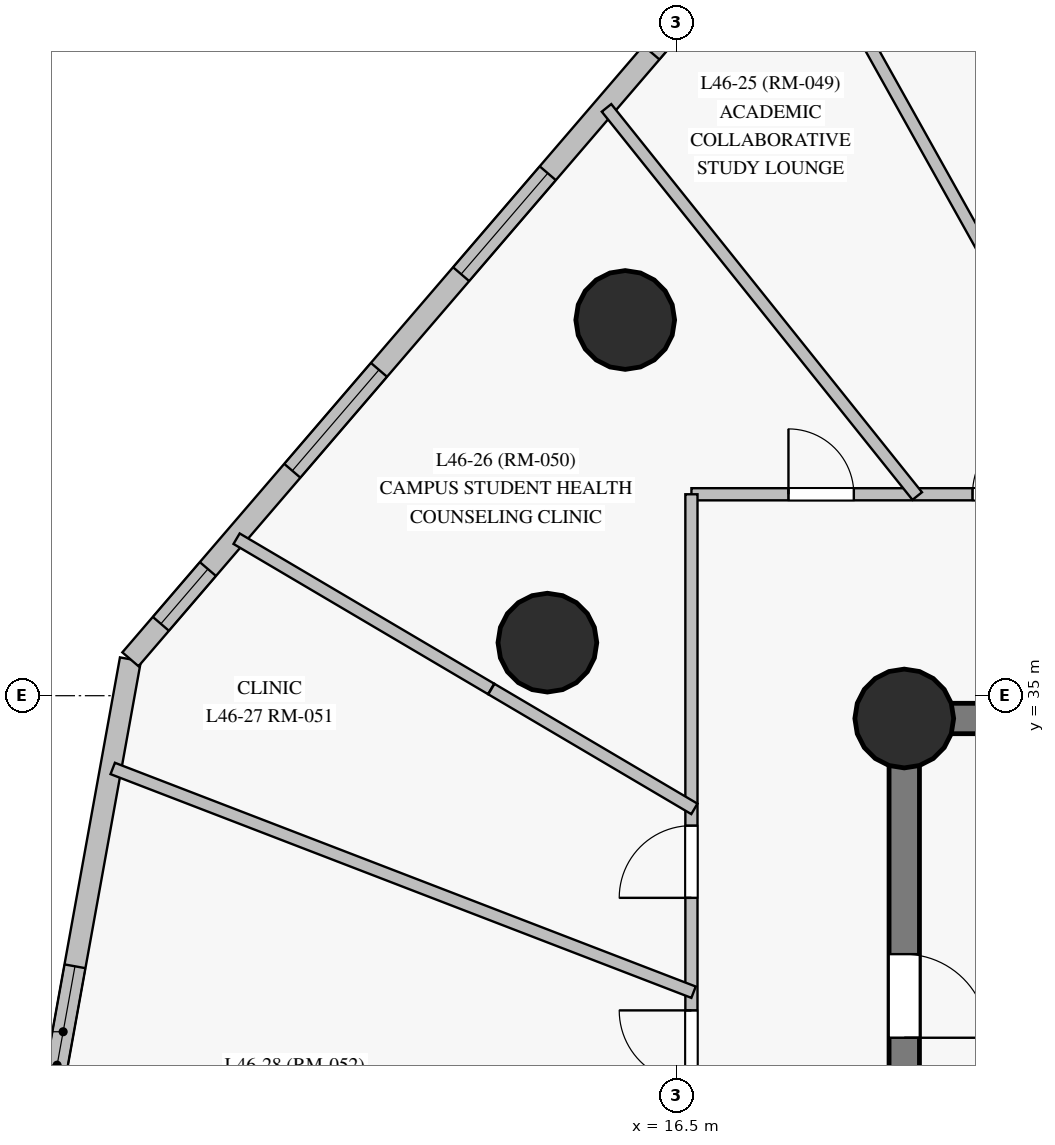
"""IFC4 building model, lengths in metres.
Left out: names, types, materials, properties, quantities, classifications, styles, units other than length and angle.
Written with IfcOpenShell. Run it as: python <this file> out.ifc"""

import sys

from ifc_helpers import new_model, si_unit, direction, frame, frame_2d, origin, origin_with_axes, origin_2d, place, context, subcontext, project, spatial, rectangle, circle, extrude, source, transform, mapped, element, fill, save


model = new_model("IFC4")
c1 = context("Model", 3, precision=1e-05, world=origin(), true_north=direction((0.0, 1.0)))
c2 = subcontext(c1, "Body", "Model", "MODEL_VIEW")
j1 = project(units=[si_unit("LENGTHUNIT", "METRE"), si_unit("PLANEANGLEUNIT", "RADIAN")], contexts=[c1])
p1 = place(None, origin())
s1 = spatial("IfcSite", under=j1, at=p1, CompositionType="ELEMENT")
p2 = place(p1, origin())
s2 = spatial("IfcBuilding", under=s1, at=p2, CompositionType="ELEMENT")
p3 = place(p2, frame((0.0, 0.0, 162.65)))
s3 = spatial("IfcBuildingStorey", under=s2, at=p3, CompositionType="ELEMENT", Elevation=162.65)
p4 = place(p3, frame((26.55, 34.7, 0.0), z_axis=(0.0, 0.0, 1.0), x_axis=(-1.0, 0.0, 0.0)))
e1 = element("IfcWall", 1, at=p4, inside=s3, PredefinedType="SHEAR", context=c2, shape_type="SweptSolid", body=[
    extrude(rectangle(XDim=7.05, YDim=0.4, at=frame_2d((3.525, 0.0))), origin(), (0.0, 0.0, 1.0), 2.825),
])
p5 = place(p4, frame((4.25, 0.0, 0.0)))
e2 = element("IfcOpeningElement", 2, at=p5, cuts=e1, PredefinedType="OPENING", context=c2, shape_type="SweptSolid", body=[
    extrude(rectangle(XDim=1.1, YDim=2.15, at=frame_2d((0.55, 1.075))), frame((0.0, 0.21, 0.0), z_axis=(0.0, -1.0, 0.0), x_axis=(1.0, 0.0, 0.0)), (0.0, 0.0, 1.0), 0.42),
])
p6 = place(p3, frame((19.5, 34.7, 0.0), z_axis=(0.0, 0.0, 1.0), x_axis=(0.0, -1.0, 0.0)))
e3 = element("IfcWall", 3, at=p6, inside=s3, PredefinedType="SHEAR", context=c2, shape_type="SweptSolid", body=[
    extrude(rectangle(XDim=16.4, YDim=0.4, at=frame_2d((8.2, 0.0))), origin(), (0.0, 0.0, 1.0), 2.825),
])
p7 = place(p6, frame((3.1, 0.0, 0.0)))
e4 = element("IfcOpeningElement", 4, at=p7, cuts=e3, PredefinedType="OPENING", context=c2, shape_type="SweptSolid", body=[
    extrude(rectangle(XDim=1.1, YDim=2.15, at=frame_2d((0.55, 1.075))), frame((0.0, 0.21, 0.0), z_axis=(0.0, -1.0, 0.0), x_axis=(1.0, 0.0, 0.0)), (0.0, 0.0, 1.0), 0.42),
])
m1 = source(origin_with_axes(), c2, "Body", "SweptSolid", [
    extrude(circle(Radius=0.65, at=origin_2d()), origin(), (0.0, 0.0, 1.0), 3.05),
])
for number, where, z_axis, x_axis in (
    (5, (19.5, 34.7, 0.0), (0.0, 0.0, 1.0), (1.0, 0.0, 0.0)),
    (6, (15.829, 39.943, 0.0), (0.0, 0.0, 1.0), (1.0, 0.0, 0.0)),
    (7, (14.805, 35.698, 0.0), (0.0, 0.0, 1.0), (1.0, 0.0, 0.0)),
):
    element("IfcColumn", number, at=place(p3, frame(where, z_axis=z_axis, x_axis=x_axis)), inside=s3, PredefinedType="COLUMN", context=c2, shape_type="MappedRepresentation", body=[
        mapped(m1, transform((0.0, 0.0, 0.0), scale=1.0)),
    ])
p8 = place(p3, frame((9.319, 35.479, 0.0), z_axis=(0.0, 0.0, 1.0), x_axis=(-0.177764832346, -0.984072997486, 0.0)))
e8 = element("IfcWall", 8, at=p8, inside=s3, PredefinedType="SOLIDWALL", context=c2, shape_type="SweptSolid", body=[
    extrude(rectangle(XDim=10.853, YDim=0.28, at=frame_2d((5.426, 0.0))), origin(), (0.0, 0.0, 1.0), 2.825),
])
p9 = place(p8, frame((4.104, 0.0, 0.85)))
e9 = element("IfcOpeningElement", 9, at=p9, cuts=e8, PredefinedType="OPENING", context=c2, shape_type="SweptSolid", body=[
    extrude(rectangle(XDim=1.75, YDim=1.65, at=frame_2d((0.875, 0.825))), frame((0.0, 0.15, 0.0), z_axis=(0.0, -1.0, 0.0), x_axis=(1.0, 0.0, 0.0)), (0.0, 0.0, 1.0), 0.3),
])
p10 = place(p8, frame((9.167, 0.0, 0.85)))
e10 = element("IfcOpeningElement", 10, at=p10, cuts=e8, PredefinedType="OPENING", context=c2, shape_type="SweptSolid", body=[
    extrude(rectangle(XDim=0.95, YDim=1.5, at=frame_2d((0.475, 0.75))), frame((0.0, 0.15, 0.0), z_axis=(0.0, -1.0, 0.0), x_axis=(1.0, 0.0, 0.0)), (0.0, 0.0, 1.0), 0.3),
])
p11 = place(p3, frame((18.215, 45.839, 0.0), z_axis=(0.0, 0.0, 1.0), x_axis=(-0.651462515178, -0.758680823085, 0.0)))
e11 = element("IfcWall", 11, at=p11, inside=s3, PredefinedType="SOLIDWALL", context=c2, shape_type="SweptSolid", body=[
    extrude(rectangle(XDim=13.656, YDim=0.28, at=frame_2d((6.828, 0.0))), origin(), (0.0, 0.0, 1.0), 2.825),
])
p12 = place(p11, frame((1.385, 0.0, 0.85)))
e12 = element("IfcOpeningElement", 12, at=p12, cuts=e11, PredefinedType="OPENING", context=c2, shape_type="SweptSolid", body=[
    extrude(rectangle(XDim=1.75, YDim=1.65, at=frame_2d((0.875, 0.825))), frame((0.0, 0.15, 0.0), z_axis=(0.0, -1.0, 0.0), x_axis=(1.0, 0.0, 0.0)), (0.0, 0.0, 1.0), 0.3),
])
p13 = place(p11, frame((5.227, 0.0, 0.85)))
e13 = element("IfcOpeningElement", 13, at=p13, cuts=e11, PredefinedType="OPENING", context=c2, shape_type="SweptSolid", body=[
    extrude(rectangle(XDim=1.75, YDim=1.65, at=frame_2d((0.875, 0.825))), frame((0.0, 0.15, 0.0), z_axis=(0.0, -1.0, 0.0), x_axis=(1.0, 0.0, 0.0)), (0.0, 0.0, 1.0), 0.3),
])
p14 = place(p11, frame((8.636, 0.0, 0.85)))
e14 = element("IfcOpeningElement", 14, at=p14, cuts=e11, PredefinedType="OPENING", context=c2, shape_type="SweptSolid", body=[
    extrude(rectangle(XDim=1.75, YDim=1.65, at=frame_2d((0.875, 0.825))), frame((0.0, 0.15, 0.0), z_axis=(0.0, -1.0, 0.0), x_axis=(1.0, 0.0, 0.0)), (0.0, 0.0, 1.0), 0.3),
])
p15 = place(p11, frame((12.091, 0.0, 0.85)))
e15 = element("IfcOpeningElement", 15, at=p15, cuts=e11, PredefinedType="OPENING", context=c2, shape_type="SweptSolid", body=[
    extrude(rectangle(XDim=0.95, YDim=1.5, at=frame_2d((0.475, 0.75))), frame((0.0, 0.15, 0.0), z_axis=(0.0, -1.0, 0.0), x_axis=(1.0, 0.0, 0.0)), (0.0, 0.0, 1.0), 0.3),
])
p16 = place(p3, frame((16.7, 37.65, 0.0), z_axis=(0.0, 0.0, 1.0), x_axis=(1.0, 0.0, 0.0)))
e16 = element("IfcWall", 16, at=p16, inside=s3, PredefinedType="PARTITIONING", context=c2, shape_type="SweptSolid", body=[
    extrude(rectangle(XDim=23.5, YDim=0.16, at=frame_2d((11.75, 0.0))), origin(), (0.0, 0.0, 1.0), 2.375),
])
p17 = place(p16, frame((20.87, 0.0, 0.0)))
e17 = element("IfcOpeningElement", 17, at=p17, cuts=e16, PredefinedType="OPENING", context=c2, shape_type="SweptSolid", body=[
    extrude(rectangle(XDim=0.95, YDim=2.15, at=frame_2d((0.475, 1.075))), frame((0.0, 0.09, 0.0), z_axis=(0.0, -1.0, 0.0), x_axis=(1.0, 0.0, 0.0)), (0.0, 0.0, 1.0), 0.18),
])
p18 = place(p16, frame((17.74, 0.0, 0.0)))
e18 = element("IfcOpeningElement", 18, at=p18, cuts=e16, PredefinedType="OPENING", context=c2, shape_type="SweptSolid", body=[
    extrude(rectangle(XDim=0.95, YDim=2.15, at=frame_2d((0.475, 1.075))), frame((0.0, 0.09, 0.0), z_axis=(0.0, -1.0, 0.0), x_axis=(1.0, 0.0, 0.0)), (0.0, 0.0, 1.0), 0.18),
])
p19 = place(p16, frame((15.44, 0.0, 0.0)))
e19 = element("IfcOpeningElement", 19, at=p19, cuts=e16, PredefinedType="OPENING", context=c2, shape_type="SweptSolid", body=[
    extrude(rectangle(XDim=0.95, YDim=2.15, at=frame_2d((0.475, 1.075))), frame((0.0, 0.09, 0.0), z_axis=(0.0, -1.0, 0.0), x_axis=(1.0, 0.0, 0.0)), (0.0, 0.0, 1.0), 0.18),
])
p20 = place(p16, frame((13.568, 0.0, 0.0)))
e20 = element("IfcOpeningElement", 20, at=p20, cuts=e16, PredefinedType="OPENING", context=c2, shape_type="SweptSolid", body=[
    extrude(rectangle(XDim=0.95, YDim=2.15, at=frame_2d((0.475, 1.075))), frame((0.0, 0.09, 0.0), z_axis=(0.0, -1.0, 0.0), x_axis=(1.0, 0.0, 0.0)), (0.0, 0.0, 1.0), 0.18),
])
p21 = place(p16, frame((11.365, 0.0, 0.0)))
e21 = element("IfcOpeningElement", 21, at=p21, cuts=e16, PredefinedType="OPENING", context=c2, shape_type="SweptSolid", body=[
    extrude(rectangle(XDim=0.95, YDim=2.15, at=frame_2d((0.475, 1.075))), frame((0.0, 0.09, 0.0), z_axis=(0.0, -1.0, 0.0), x_axis=(1.0, 0.0, 0.0)), (0.0, 0.0, 1.0), 0.18),
])
p22 = place(p16, frame((9.159, 0.0, 0.0)))
e22 = element("IfcOpeningElement", 22, at=p22, cuts=e16, PredefinedType="OPENING", context=c2, shape_type="SweptSolid", body=[
    extrude(rectangle(XDim=0.95, YDim=2.15, at=frame_2d((0.475, 1.075))), frame((0.0, 0.09, 0.0), z_axis=(0.0, -1.0, 0.0), x_axis=(1.0, 0.0, 0.0)), (0.0, 0.0, 1.0), 0.18),
])
p23 = place(p16, frame((5.89, 0.0, 0.0)))
e23 = element("IfcOpeningElement", 23, at=p23, cuts=e16, PredefinedType="OPENING", context=c2, shape_type="SweptSolid", body=[
    extrude(rectangle(XDim=0.95, YDim=2.15, at=frame_2d((0.475, 1.075))), frame((0.0, 0.09, 0.0), z_axis=(0.0, -1.0, 0.0), x_axis=(1.0, 0.0, 0.0)), (0.0, 0.0, 1.0), 0.18),
])
p24 = place(p16, frame((3.698, 0.0, 0.0)))
e24 = element("IfcOpeningElement", 24, at=p24, cuts=e16, PredefinedType="OPENING", context=c2, shape_type="SweptSolid", body=[
    extrude(rectangle(XDim=0.95, YDim=2.15, at=frame_2d((0.475, 1.075))), frame((0.0, 0.09, 0.0), z_axis=(0.0, -1.0, 0.0), x_axis=(1.0, 0.0, 0.0)), (0.0, 0.0, 1.0), 0.18),
])
p25 = place(p16, frame((1.277, 0.0, 0.0)))
e25 = element("IfcOpeningElement", 25, at=p25, cuts=e16, PredefinedType="OPENING", context=c2, shape_type="SweptSolid", body=[
    extrude(rectangle(XDim=0.86, YDim=2.04, at=frame_2d((0.43, 1.02))), frame((0.0, 0.09, 0.0), z_axis=(0.0, -1.0, 0.0), x_axis=(1.0, 0.0, 0.0)), (0.0, 0.0, 1.0), 0.18),
])
p26 = place(p3, frame((16.7, 15.35, 0.0), z_axis=(0.0, 0.0, 1.0), x_axis=(0.0, 1.0, 0.0)))
e26 = element("IfcWall", 26, at=p26, inside=s3, PredefinedType="PARTITIONING", context=c2, shape_type="SweptSolid", body=[
    extrude(rectangle(XDim=22.3, YDim=0.16, at=frame_2d((11.15, 0.0))), origin(), (0.0, 0.0, 1.0), 2.275),
])
p27 = place(p26, frame((11.715, 0.0, 0.0)))
e27 = element("IfcOpeningElement", 27, at=p27, cuts=e26, PredefinedType="OPENING", context=c2, shape_type="SweptSolid", body=[
    extrude(rectangle(XDim=0.95, YDim=2.15, at=frame_2d((0.475, 1.075))), frame((0.0, 0.09, 0.0), z_axis=(0.0, -1.0, 0.0), x_axis=(1.0, 0.0, 0.0)), (0.0, 0.0, 1.0), 0.18),
])
p28 = place(p26, frame((7.33, 0.0, 0.0)))
e28 = element("IfcOpeningElement", 28, at=p28, cuts=e26, PredefinedType="OPENING", context=c2, shape_type="SweptSolid", body=[
    extrude(rectangle(XDim=0.96, YDim=2.15, at=frame_2d((0.48, 1.075))), frame((0.0, 0.09, 0.0), z_axis=(0.0, -1.0, 0.0), x_axis=(1.0, 0.0, 0.0)), (0.0, 0.0, 1.0), 0.18),
])
p29 = place(p26, frame((4.61, 0.0, 0.0)))
e29 = element("IfcOpeningElement", 29, at=p29, cuts=e26, PredefinedType="OPENING", context=c2, shape_type="SweptSolid", body=[
    extrude(rectangle(XDim=0.95, YDim=2.15, at=frame_2d((0.475, 1.075))), frame((0.0, 0.09, 0.0), z_axis=(0.0, -1.0, 0.0), x_axis=(1.0, 0.0, 0.0)), (0.0, 0.0, 1.0), 0.18),
])
p30 = place(p26, frame((16.99, 0.0, 0.0)))
e30 = element("IfcOpeningElement", 30, at=p30, cuts=e26, PredefinedType="OPENING", context=c2, shape_type="SweptSolid", body=[
    extrude(rectangle(XDim=0.95, YDim=2.15, at=frame_2d((0.475, 1.075))), frame((0.0, 0.09, 0.0), z_axis=(0.0, -1.0, 0.0), x_axis=(1.0, 0.0, 0.0)), (0.0, 0.0, 1.0), 0.18),
])
p31 = place(p26, frame((14.56, 0.0, 0.0)))
e31 = element("IfcOpeningElement", 31, at=p31, cuts=e26, PredefinedType="OPENING", context=c2, shape_type="SweptSolid", body=[
    extrude(rectangle(XDim=0.95, YDim=2.15, at=frame_2d((0.475, 1.075))), frame((0.0, 0.09, 0.0), z_axis=(0.0, -1.0, 0.0), x_axis=(1.0, 0.0, 0.0)), (0.0, 0.0, 1.0), 0.18),
])
p32 = place(p26, frame((13.43, 0.0, 0.0)))
e32 = element("IfcOpeningElement", 32, at=p32, cuts=e26, PredefinedType="OPENING", context=c2, shape_type="SweptSolid", body=[
    extrude(rectangle(XDim=0.95, YDim=2.15, at=frame_2d((0.475, 1.075))), frame((0.0, 0.09, 0.0), z_axis=(0.0, -1.0, 0.0), x_axis=(1.0, 0.0, 0.0)), (0.0, 0.0, 1.0), 0.18),
])
p33 = place(p3, frame((22.362, 37.611, 0.0), z_axis=(0.0, 0.0, 1.0), x_axis=(-0.487695929891, 0.873013562305, 0.0)))
e33 = element("IfcWall", 33, at=p33, inside=s3, PredefinedType="PARTITIONING", context=c2, shape_type="SweptSolid", body=[
    extrude(rectangle(XDim=9.031, YDim=0.16, at=frame_2d((4.515, 0.0))), origin(), (0.0, 0.0, 1.0), 2.825),
])
p34 = place(p3, frame((16.728, 31.099, 0.0), z_axis=(0.0, 0.0, 1.0), x_axis=(-0.933150299974, 0.359486463805, 0.0)))
e34 = element("IfcWall", 34, at=p34, inside=s3, PredefinedType="PARTITIONING", context=c2, shape_type="SweptSolid", body=[
    extrude(rectangle(XDim=8.189, YDim=0.16, at=frame_2d((4.094, 0.0))), origin(), (0.0, 0.0, 1.0), 2.825),
])
p35 = place(p3, frame((19.671, 37.627, 0.0), z_axis=(0.0, 0.0, 1.0), x_axis=(-0.624931699551, 0.78067942902, 0.0)))
e35 = element("IfcWall", 35, at=p35, inside=s3, PredefinedType="PARTITIONING", context=c2, shape_type="SweptSolid", body=[
    extrude(rectangle(XDim=6.541, YDim=0.16, at=frame_2d((3.271, 0.0))), origin(), (0.0, 0.0, 1.0), 2.825),
])
p36 = place(p3, frame((14.065, 35.089, 0.0), z_axis=(0.0, 0.0, 1.0), x_axis=(-0.861187639937, 0.508287171607, 0.0)))
e36 = element("IfcWall", 36, at=p36, inside=s3, PredefinedType="PARTITIONING", context=c2, shape_type="SweptSolid", body=[
    extrude(rectangle(XDim=3.889, YDim=0.16, at=frame_2d((1.944, 0.0))), origin(), (0.0, 0.0, 1.0), 2.825),
])
p37 = place(p3, frame((16.739, 33.511, 0.0), z_axis=(0.0, 0.0, 1.0), x_axis=(-0.861200683606, 0.508265071155, 0.0)))
e37 = element("IfcWall", 37, at=p37, inside=s3, PredefinedType="PARTITIONING", context=c2, shape_type="SweptSolid", body=[
    extrude(rectangle(XDim=3.101, YDim=0.16, at=frame_2d((1.551, 0.0))), origin(), (0.0, 0.0, 1.0), 2.825),
])
m2 = source(origin_with_axes(), c2, "Body", "SweptSolid", [
    extrude(rectangle(XDim=1.75, YDim=1.65, at=frame_2d((0.875, 0.825))), frame((0.0, 0.03, 0.0), z_axis=(0.0, -1.0, 0.0), x_axis=(1.0, 0.0, 0.0)), (0.0, 0.0, 1.0), 0.06),
])
p38 = place(p9, origin())
e38 = element("IfcWindow", 38, at=p38, inside=s3, PartitioningType="SINGLE_PANEL", PredefinedType="WINDOW", context=c2, shape_type="MappedRepresentation", body=[
    mapped(m2, transform((0.0, 0.0, 0.0), scale=1.0)),
])
fill(e9, e38)
p39 = place(p12, origin())
e39 = element("IfcWindow", 39, at=p39, inside=s3, PartitioningType="SINGLE_PANEL", PredefinedType="WINDOW", context=c2, shape_type="MappedRepresentation", body=[
    mapped(m2, transform((0.0, 0.0, 0.0), scale=1.0)),
])
fill(e12, e39)
p40 = place(p13, origin())
e40 = element("IfcWindow", 40, at=p40, inside=s3, PartitioningType="SINGLE_PANEL", PredefinedType="WINDOW", context=c2, shape_type="MappedRepresentation", body=[
    mapped(m2, transform((0.0, 0.0, 0.0), scale=1.0)),
])
fill(e13, e40)
p41 = place(p14, origin())
e41 = element("IfcWindow", 41, at=p41, inside=s3, PartitioningType="SINGLE_PANEL", PredefinedType="WINDOW", context=c2, shape_type="MappedRepresentation", body=[
    mapped(m2, transform((0.0, 0.0, 0.0), scale=1.0)),
])
fill(e14, e41)
m3 = source(origin_with_axes(), c2, "Body", "SweptSolid", [
    extrude(rectangle(XDim=0.95, YDim=1.5, at=frame_2d((0.475, 0.75))), frame((0.0, 0.03, 0.0), z_axis=(0.0, -1.0, 0.0), x_axis=(1.0, 0.0, 0.0)), (0.0, 0.0, 1.0), 0.06),
])
p42 = place(p15, origin())
e42 = element("IfcWindow", 42, at=p42, inside=s3, PartitioningType="SINGLE_PANEL", PredefinedType="WINDOW", context=c2, shape_type="MappedRepresentation", body=[
    mapped(m3, transform((0.0, 0.0, 0.0), scale=1.0)),
])
fill(e15, e42)
m4 = source(origin_with_axes(), c2, "Body", "SweptSolid", [
    extrude(rectangle(XDim=1.1, YDim=2.15, at=frame_2d((0.55, 1.075))), frame((0.0, 0.025, 0.0), z_axis=(0.0, -1.0, 0.0), x_axis=(1.0, 0.0, 0.0)), (0.0, 0.0, 1.0), 0.05),
])
p43 = place(p7, origin())
e43 = element("IfcDoor", 43, at=p43, inside=s3, OperationType="SINGLE_SWING_RIGHT", PredefinedType="DOOR", context=c2, shape_type="MappedRepresentation", body=[
    mapped(m4, transform((0.0, 0.0, 0.0), scale=1.0)),
])
fill(e4, e43)
m5 = source(origin_with_axes(), c2, "Body", "SweptSolid", [
    extrude(rectangle(XDim=0.95, YDim=2.15, at=frame_2d((0.475, 1.075))), frame((0.0, 0.025, 0.0), z_axis=(0.0, -1.0, 0.0), x_axis=(1.0, 0.0, 0.0)), (0.0, 0.0, 1.0), 0.05),
])
p44 = place(p24, origin())
e44 = element("IfcDoor", 44, at=p44, inside=s3, OperationType="SINGLE_SWING_RIGHT", PredefinedType="DOOR", context=c2, shape_type="MappedRepresentation", body=[
    mapped(m5, transform((0.0, 0.0, 0.0), scale=1.0)),
])
fill(e24, e44)
p45 = place(p30, origin())
e45 = element("IfcDoor", 45, at=p45, inside=s3, OperationType="SINGLE_SWING_LEFT", PredefinedType="DOOR", context=c2, shape_type="MappedRepresentation", body=[
    mapped(m5, transform((0.0, 0.0, 0.0), scale=1.0)),
])
fill(e30, e45)
p46 = place(p31, origin())
e46 = element("IfcDoor", 46, at=p46, inside=s3, OperationType="SINGLE_SWING_RIGHT", PredefinedType="DOOR", context=c2, shape_type="MappedRepresentation", body=[
    mapped(m5, transform((0.0, 0.0, 0.0), scale=1.0)),
])
fill(e31, e46)
m6 = source(origin_with_axes(), c2, "Body", "SweptSolid", [
    extrude(rectangle(XDim=0.86, YDim=2.04, at=frame_2d((0.43, 1.02))), frame((0.0, 0.025, 0.0), z_axis=(0.0, -1.0, 0.0), x_axis=(1.0, 0.0, 0.0)), (0.0, 0.0, 1.0), 0.05),
])
p47 = place(p25, origin())
e47 = element("IfcDoor", 47, at=p47, inside=s3, OperationType="SINGLE_SWING_LEFT", PredefinedType="DOOR", context=c2, shape_type="MappedRepresentation", body=[
    mapped(m6, transform((0.0, 0.0, 0.0), scale=1.0)),
])
fill(e25, e47)
save(model, sys.argv[1])
